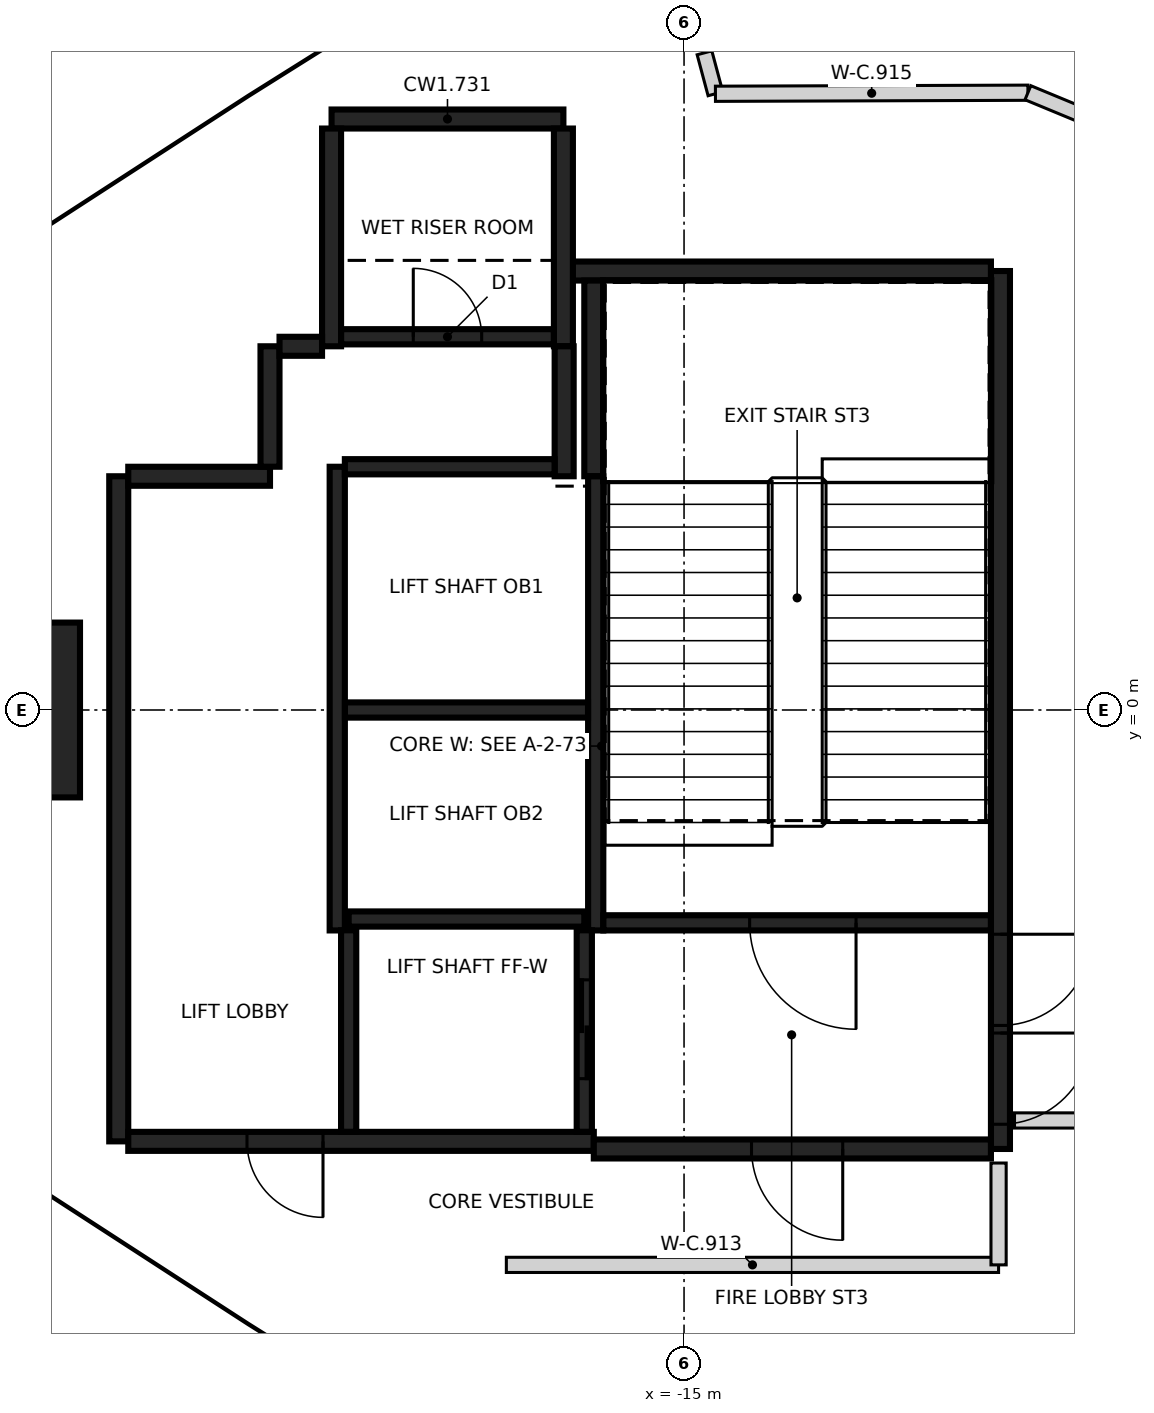
"""IFC4 building model, lengths in metres.
Left out: names, types, materials, properties, quantities, classifications, styles, units other than length and angle.
Written with IfcOpenShell. Run it as: python <this file> out.ifc"""

import sys

from ifc_helpers import new_model, si_unit, direction, frame, frame_2d, origin, origin_2d, place, context, subcontext, project, spatial, rectangle, extrude, element, fill, save


model = new_model("IFC4")
c1 = context("Model", 3, precision=1e-05, world=origin(), true_north=direction((0.0, 1.0)))
c2 = subcontext(c1, "Body", "Model", "MODEL_VIEW")
j1 = project(units=[si_unit("LENGTHUNIT", "METRE"), si_unit("PLANEANGLEUNIT", "RADIAN")], contexts=[c1])
p1 = place(None, origin())
s1 = spatial("IfcSite", under=j1, at=p1, CompositionType="ELEMENT")
p2 = place(p1, origin())
s2 = spatial("IfcBuilding", under=s1, at=p2, CompositionType="ELEMENT")
p3 = place(p2, frame((0.0, 0.0, 257.4)))
s3 = spatial("IfcBuildingStorey", under=s2, at=p3, CompositionType="ELEMENT", Elevation=257.4)
p4 = place(p3, frame((-24.347, 0.0, -0.4), z_axis=(0.0, 0.0, 1.0), x_axis=(1.0, 0.0, 0.0)))
e1 = element("IfcColumn", 1, at=p4, inside=s3, PredefinedType="COLUMN", context=c2, shape_type="SweptSolid", body=[
    extrude(rectangle(XDim=2.8, YDim=2.3, at=origin_2d()), origin(), (0.0, 0.0, 1.0), 4.85),
])
p5 = place(p3, frame((-10.837, 5.775, 0.0), z_axis=(0.0, 0.0, 1.0), x_axis=(0.0, -1.0, 0.0)))
e2 = element("IfcWall", 2, at=p5, inside=s3, PredefinedType="SHEAR", context=c2, shape_type="SweptSolid", body=[
    extrude(rectangle(XDim=11.55, YDim=0.25, at=frame_2d((5.775, 0.0))), origin(), (0.0, 0.0, 1.0), 4.45),
])
p6 = place(p5, frame((10.025, 0.0, 0.0)))
e3 = element("IfcOpeningElement", 3, at=p6, cuts=e2, PredefinedType="OPENING", context=c2, shape_type="SweptSolid", body=[
    extrude(rectangle(XDim=1.2, YDim=2.1, at=frame_2d((0.6, 1.05))), frame((0.0, 0.135, 0.0), z_axis=(0.0, -1.0, 0.0), x_axis=(1.0, 0.0, 0.0)), (0.0, 0.0, 1.0), 0.27),
])
p7 = place(p5, frame((8.725, 0.0, 0.0)))
e4 = element("IfcOpeningElement", 4, at=p7, cuts=e2, PredefinedType="OPENING", context=c2, shape_type="SweptSolid", body=[
    extrude(rectangle(XDim=1.2, YDim=2.1, at=frame_2d((0.6, 1.05))), frame((0.0, 0.135, 0.0), z_axis=(0.0, -1.0, 0.0), x_axis=(1.0, 0.0, 0.0)), (0.0, 0.0, 1.0), 0.27),
])
p8 = place(p3, frame((-22.437, -5.675, 0.0), z_axis=(0.0, 0.0, 1.0), x_axis=(0.0, 1.0, 0.0)))
e5 = element("IfcWall", 5, at=p8, inside=s3, PredefinedType="SHEAR", context=c2, shape_type="SweptSolid", body=[
    extrude(rectangle(XDim=8.75, YDim=0.25, at=frame_2d((4.375, 0.0))), origin(), (0.0, 0.0, 1.0), 4.45),
])
p9 = place(p3, frame((-16.187, -5.675, 0.0), z_axis=(0.0, 0.0, 1.0), x_axis=(-1.0, 0.0, 0.0)))
e6 = element("IfcWall", 6, at=p9, inside=s3, PredefinedType="SHEAR", context=c2, shape_type="SweptSolid", body=[
    extrude(rectangle(XDim=6.125, YDim=0.25, at=frame_2d((3.062, 0.0))), origin(), (0.0, 0.0, 1.0), 4.45),
])
p10 = place(p9, frame((3.563, 0.0, 0.0)))
e7 = element("IfcOpeningElement", 7, at=p10, cuts=e6, PredefinedType="OPENING", context=c2, shape_type="SweptSolid", body=[
    extrude(rectangle(XDim=1.0, YDim=2.1, at=frame_2d((0.5, 1.05))), frame((0.0, 0.135, 0.0), z_axis=(0.0, -1.0, 0.0), x_axis=(1.0, 0.0, 0.0)), (0.0, 0.0, 1.0), 0.27),
])
p11 = place(p3, frame((-10.963, -5.775, 0.0), z_axis=(0.0, 0.0, 1.0), x_axis=(-1.0, 0.0, 0.0)))
e8 = element("IfcWall", 8, at=p11, inside=s3, PredefinedType="SHEAR", context=c2, shape_type="SweptSolid", body=[
    extrude(rectangle(XDim=5.225, YDim=0.25, at=frame_2d((2.612, 0.0))), origin(), (0.0, 0.0, 1.0), 4.45),
])
p12 = place(p11, frame((1.95, 0.0, 0.0)))
e9 = element("IfcOpeningElement", 9, at=p12, cuts=e8, PredefinedType="OPENING", context=c2, shape_type="SweptSolid", body=[
    extrude(rectangle(XDim=1.2, YDim=2.1, at=frame_2d((0.6, 1.05))), frame((0.0, 0.135, 0.0), z_axis=(0.0, -1.0, 0.0), x_axis=(1.0, 0.0, 0.0)), (0.0, 0.0, 1.0), 0.27),
])
p13 = place(p3, frame((-16.472, 5.775, 0.0), z_axis=(0.0, 0.0, 1.0), x_axis=(1.0, 0.0, 0.0)))
e10 = element("IfcWall", 10, at=p13, inside=s3, PredefinedType="SHEAR", context=c2, shape_type="SweptSolid", body=[
    extrude(rectangle(XDim=5.51, YDim=0.25, at=frame_2d((2.755, 0.0))), origin(), (0.0, 0.0, 1.0), 4.45),
])
p14 = place(p3, frame((-19.637, 7.775, 0.0), z_axis=(0.0, 0.0, 1.0), x_axis=(1.0, 0.0, 0.0)))
e11 = element("IfcWall", 11, at=p14, inside=s3, PredefinedType="SHEAR", context=c2, shape_type="SweptSolid", body=[
    extrude(rectangle(XDim=3.05, YDim=0.25, at=frame_2d((1.525, 0.0))), origin(), (0.0, 0.0, 1.0), 4.45),
])
for number, where, z_axis, x_axis in (
    (12, (-16.587, 7.65, 0.0), (0.0, 0.0, 1.0), (0.0, -1.0, 0.0)),
    (13, (-19.637, 4.785, 0.0), (0.0, 0.0, 1.0), (0.0, 1.0, 0.0)),
):
    element("IfcWall", number, at=place(p3, frame(where, z_axis=z_axis, x_axis=x_axis)), inside=s3, PredefinedType="SHEAR", context=c2, shape_type="SweptSolid", body=[
        extrude(rectangle(XDim=2.865, YDim=0.25, at=frame_2d((1.432, 0.0))), origin(), (0.0, 0.0, 1.0), 4.45),
    ])
p15 = place(p3, frame((-16.187, 3.075, 0.0), z_axis=(0.0, 0.0, 1.0), x_axis=(0.0, 1.0, 0.0)))
e14 = element("IfcWall", 14, at=p15, inside=s3, PredefinedType="SHEAR", context=c2, shape_type="SweptSolid", body=[
    extrude(rectangle(XDim=2.575, YDim=0.25, at=frame_2d((1.287, 0.0))), origin(), (0.0, 0.0, 1.0), 4.45),
])
p16 = place(p3, frame((-22.312, 3.075, 0.0), z_axis=(0.0, 0.0, 1.0), x_axis=(1.0, 0.0, 0.0)))
e15 = element("IfcWall", 15, at=p16, inside=s3, PredefinedType="SHEAR", context=c2, shape_type="SweptSolid", body=[
    extrude(rectangle(XDim=1.865, YDim=0.25, at=frame_2d((0.932, 0.0))), origin(), (0.0, 0.0, 1.0), 4.45),
])
p17 = place(p3, frame((-16.577, 4.785, 0.0), z_axis=(0.0, 0.0, 1.0), x_axis=(0.0, -1.0, 0.0)))
e16 = element("IfcWall", 16, at=p17, inside=s3, PredefinedType="SHEAR", context=c2, shape_type="SweptSolid", body=[
    extrude(rectangle(XDim=1.71, YDim=0.25, at=frame_2d((0.855, 0.0))), origin(), (0.0, 0.0, 1.0), 4.45),
])
p18 = place(p3, frame((-20.447, 3.2, 0.0), z_axis=(0.0, 0.0, 1.0), x_axis=(0.0, 1.0, 0.0)))
e17 = element("IfcWall", 17, at=p18, inside=s3, PredefinedType="SHEAR", context=c2, shape_type="SweptSolid", body=[
    extrude(rectangle(XDim=1.584, YDim=0.25, at=frame_2d((0.792, 0.0))), origin(), (0.0, 0.0, 1.0), 4.45),
])
p19 = place(p3, frame((-20.322, 4.785, 0.0), z_axis=(0.0, 0.0, 1.0), x_axis=(1.0, 0.0, 0.0)))
e18 = element("IfcWall", 18, at=p19, inside=s3, PredefinedType="SHEAR", context=c2, shape_type="SweptSolid", body=[
    extrude(rectangle(XDim=0.559, YDim=0.25, at=frame_2d((0.28, 0.0))), origin(), (0.0, 0.0, 1.0), 4.45),
])
p20 = place(p3, frame((-16.162, 3.074, 0.0), z_axis=(0.0, 0.0, 1.0), x_axis=(0.0, -1.0, 0.0)))
e19 = element("IfcWall", 19, at=p20, inside=s3, PredefinedType="SHEAR", context=c2, shape_type="SweptSolid", body=[
    extrude(rectangle(XDim=5.974, YDim=0.2, at=frame_2d((2.987, 0.0))), origin(), (0.0, 0.0, 1.0), 4.45),
])
p21 = place(p3, frame((-19.562, -2.9, 0.0), z_axis=(0.0, 0.0, 1.0), x_axis=(0.0, 1.0, 0.0)))
e20 = element("IfcWall", 20, at=p21, inside=s3, PredefinedType="SHEAR", context=c2, shape_type="SweptSolid", body=[
    extrude(rectangle(XDim=6.1, YDim=0.2, at=frame_2d((3.05, 0.0))), origin(), (0.0, 0.0, 1.0), 4.45),
])
p22 = place(p3, frame((-10.963, -2.8, 0.0), z_axis=(0.0, 0.0, 1.0), x_axis=(-1.0, 0.0, 0.0)))
e21 = element("IfcWall", 21, at=p22, inside=s3, PredefinedType="SHEAR", context=c2, shape_type="SweptSolid", body=[
    extrude(rectangle(XDim=5.098, YDim=0.2, at=frame_2d((2.549, 0.0))), origin(), (0.0, 0.0, 1.0), 4.45),
])
p23 = place(p22, frame((1.774, 0.0, 0.0)))
e22 = element("IfcOpeningElement", 22, at=p23, cuts=e21, PredefinedType="OPENING", context=c2, shape_type="SweptSolid", body=[
    extrude(rectangle(XDim=1.4, YDim=2.1, at=frame_2d((0.7, 1.05))), frame((0.0, 0.11, 0.0), z_axis=(0.0, -1.0, 0.0), x_axis=(1.0, 0.0, 0.0)), (0.0, 0.0, 1.0), 0.22),
])
p24 = place(p3, frame((-16.263, 0.0, 0.0), z_axis=(0.0, 0.0, 1.0), x_axis=(-1.0, 0.0, 0.0)))
e23 = element("IfcWall", 23, at=p24, inside=s3, PredefinedType="SHEAR", context=c2, shape_type="SweptSolid", body=[
    extrude(rectangle(XDim=3.198, YDim=0.2, at=frame_2d((1.599, 0.0))), origin(), (0.0, 0.0, 1.0), 4.45),
])
p25 = place(p3, frame((-19.511, 4.91, 0.0), z_axis=(0.0, 0.0, 1.0), x_axis=(1.0, 0.0, 0.0)))
e24 = element("IfcWall", 24, at=p25, inside=s3, PredefinedType="SHEAR", context=c2, shape_type="SweptSolid", body=[
    extrude(rectangle(XDim=2.798, YDim=0.2, at=frame_2d((1.399, 0.0))), origin(), (0.0, 0.0, 1.0), 4.45),
])
p26 = place(p25, frame((0.949, 0.0, 0.0)))
e25 = element("IfcOpeningElement", 25, at=p26, cuts=e24, PredefinedType="OPENING", context=c2, shape_type="SweptSolid", body=[
    extrude(rectangle(XDim=0.9, YDim=2.1, at=frame_2d((0.45, 1.05))), frame((0.0, 0.11, 0.0), z_axis=(0.0, -1.0, 0.0), x_axis=(1.0, 0.0, 0.0)), (0.0, 0.0, 1.0), 0.22),
])
p27 = place(p3, frame((-19.462, 3.2, 0.0), z_axis=(0.0, 0.0, 1.0), x_axis=(1.0, 0.0, 0.0)))
e26 = element("IfcWall", 26, at=p27, inside=s3, PredefinedType="SHEAR", context=c2, shape_type="SweptSolid", body=[
    extrude(rectangle(XDim=2.759, YDim=0.2, at=frame_2d((1.379, 0.0))), origin(), (0.0, 0.0, 1.0), 4.45),
])
p28 = place(p3, frame((-19.412, -2.75, 0.0), z_axis=(0.0, 0.0, 1.0), x_axis=(1.0, 0.0, 0.0)))
e27 = element("IfcWall", 27, at=p28, inside=s3, PredefinedType="SHEAR", context=c2, shape_type="SweptSolid", body=[
    extrude(rectangle(XDim=3.1, YDim=0.2, at=frame_2d((1.55, 0.0))), origin(), (0.0, 0.0, 1.0), 4.45),
])
p29 = place(p3, frame((-16.312, -2.898, 0.0), z_axis=(0.0, 0.0, 1.0), x_axis=(0.0, -1.0, 0.0)))
e28 = element("IfcWall", 28, at=p29, inside=s3, PredefinedType="SHEAR", context=c2, shape_type="SweptSolid", body=[
    extrude(rectangle(XDim=2.651, YDim=0.2, at=frame_2d((1.325, 0.0))), origin(), (0.0, 0.0, 1.0), 4.45),
])
p30 = place(p29, frame((0.652, 0.0, 0.0)))
e29 = element("IfcOpeningElement", 29, at=p30, cuts=e28, PredefinedType="OPENING", context=c2, shape_type="SweptSolid", body=[
    extrude(rectangle(XDim=1.3, YDim=2.1, at=frame_2d((0.65, 1.05))), frame((0.0, 0.11, 0.0), z_axis=(0.0, -1.0, 0.0), x_axis=(1.0, 0.0, 0.0)), (0.0, 0.0, 1.0), 0.22),
])
p31 = place(p3, frame((-19.412, -5.549, 0.0), z_axis=(0.0, 0.0, 1.0), x_axis=(0.0, 1.0, 0.0)))
e30 = element("IfcWall", 30, at=p31, inside=s3, PredefinedType="SHEAR", context=c2, shape_type="SweptSolid", body=[
    extrude(rectangle(XDim=2.651, YDim=0.2, at=frame_2d((1.325, 0.0))), origin(), (0.0, 0.0, 1.0), 4.45),
])
p32 = place(p3, frame((-17.338, -7.3, 0.0), z_axis=(0.0, 0.0, 1.0), x_axis=(1.0, 0.0, 0.0)))
e31 = element("IfcWall", 31, at=p32, inside=s3, PredefinedType="PARTITIONING", context=c2, shape_type="SweptSolid", body=[
    extrude(rectangle(XDim=6.476, YDim=0.2, at=frame_2d((3.238, 0.0))), origin(), (0.0, 0.0, 1.0), 4.45),
])
p33 = place(p3, frame((-14.731, 8.646, 0.0), z_axis=(0.0, 0.0, 1.0), x_axis=(0.258152815448, -0.966104095777, 0.0)))
e32 = element("IfcWall", 32, at=p33, inside=s3, PredefinedType="PARTITIONING", context=c2, shape_type="SweptSolid", body=[
    extrude(rectangle(XDim=0.558, YDim=0.2, at=frame_2d((0.279, 0.0))), origin(), (0.0, 0.0, 1.0), 4.45),
])
p34 = place(p3, frame((-14.587, 8.107, 0.0), z_axis=(0.0, 0.0, 1.0), x_axis=(0.999994067454, 0.003444569184, 0.0)))
e33 = element("IfcWall", 33, at=p34, inside=s3, PredefinedType="PARTITIONING", context=c2, shape_type="SweptSolid", body=[
    extrude(rectangle(XDim=4.111, YDim=0.2, at=frame_2d((2.055, 0.0))), origin(), (0.0, 0.0, 1.0), 4.45),
])
p35 = place(p3, frame((-10.862, -7.3, 0.0), z_axis=(0.0, 0.0, 1.0), x_axis=(0.0, 1.0, 0.0)))
e34 = element("IfcWall", 34, at=p35, inside=s3, PredefinedType="PARTITIONING", context=c2, shape_type="SweptSolid", body=[
    extrude(rectangle(XDim=1.34, YDim=0.2, at=frame_2d((0.67, 0.0))), origin(), (0.0, 0.0, 1.0), 4.45),
])
p36 = place(p3, frame((-10.652, -5.4, 0.0), z_axis=(0.0, 0.0, 1.0), x_axis=(1.0, 0.0, 0.0)))
e35 = element("IfcWall", 35, at=p36, inside=s3, PredefinedType="PARTITIONING", context=c2, shape_type="SweptSolid", body=[
    extrude(rectangle(XDim=2.083, YDim=0.2, at=frame_2d((1.042, 0.0))), origin(), (0.0, 0.0, 1.0), 4.45),
])
p37 = place(p3, frame((-10.476, 8.121, 0.0), z_axis=(0.0, 0.0, 1.0), x_axis=(0.923898220274, -0.382638312998, 0.0)))
e36 = element("IfcWall", 36, at=p37, inside=s3, PredefinedType="PARTITIONING", context=c2, shape_type="SweptSolid", body=[
    extrude(rectangle(XDim=1.43, YDim=0.2, at=frame_2d((0.715, 0.0))), origin(), (0.0, 0.0, 1.0), 4.45),
])
p38 = place(p30, origin())
e37 = element("IfcDoor", 37, at=p38, inside=s3, OperationType="SLIDING_TO_RIGHT", PredefinedType="DOOR", context=c2, shape_type="SweptSolid", body=[
    extrude(rectangle(XDim=1.3, YDim=2.1, at=frame_2d((0.65, 1.05))), frame((0.0, 0.025, 0.0), z_axis=(0.0, -1.0, 0.0), x_axis=(1.0, 0.0, 0.0)), (0.0, 0.0, 1.0), 0.05),
])
fill(e29, e37)
p39 = place(p10, origin())
e38 = element("IfcDoor", 38, at=p39, inside=s3, OperationType="SINGLE_SWING_LEFT", PredefinedType="DOOR", context=c2, shape_type="SweptSolid", body=[
    extrude(rectangle(XDim=1.0, YDim=2.1, at=frame_2d((0.5, 1.05))), frame((0.0, 0.025, 0.0), z_axis=(0.0, -1.0, 0.0), x_axis=(1.0, 0.0, 0.0)), (0.0, 0.0, 1.0), 0.05),
])
fill(e7, e38)
p40 = place(p6, origin())
e39 = element("IfcDoor", 39, at=p40, inside=s3, OperationType="SINGLE_SWING_LEFT", PredefinedType="DOOR", context=c2, shape_type="SweptSolid", body=[
    extrude(rectangle(XDim=1.2, YDim=2.1, at=frame_2d((0.6, 1.05))), frame((0.0, 0.025, 0.0), z_axis=(0.0, -1.0, 0.0), x_axis=(1.0, 0.0, 0.0)), (0.0, 0.0, 1.0), 0.05),
])
fill(e3, e39)
p41 = place(p7, origin())
e40 = element("IfcDoor", 40, at=p41, inside=s3, OperationType="SINGLE_SWING_RIGHT", PredefinedType="DOOR", context=c2, shape_type="SweptSolid", body=[
    extrude(rectangle(XDim=1.2, YDim=2.1, at=frame_2d((0.6, 1.05))), frame((0.0, 0.025, 0.0), z_axis=(0.0, -1.0, 0.0), x_axis=(1.0, 0.0, 0.0)), (0.0, 0.0, 1.0), 0.05),
])
fill(e4, e40)
p42 = place(p23, origin())
e41 = element("IfcDoor", 41, at=p42, inside=s3, OperationType="SINGLE_SWING_RIGHT", PredefinedType="DOOR", context=c2, shape_type="SweptSolid", body=[
    extrude(rectangle(XDim=1.4, YDim=2.1, at=frame_2d((0.7, 1.05))), frame((0.0, 0.025, 0.0), z_axis=(0.0, -1.0, 0.0), x_axis=(1.0, 0.0, 0.0)), (0.0, 0.0, 1.0), 0.05),
])
fill(e22, e41)
p43 = place(p26, origin())
e42 = element("IfcDoor", 42, at=p43, inside=s3, OperationType="SINGLE_SWING_LEFT", PredefinedType="DOOR", context=c2, shape_type="SweptSolid", body=[
    extrude(rectangle(XDim=0.9, YDim=2.1, at=frame_2d((0.45, 1.05))), frame((0.0, 0.025, 0.0), z_axis=(0.0, -1.0, 0.0), x_axis=(1.0, 0.0, 0.0)), (0.0, 0.0, 1.0), 0.05),
])
fill(e25, e42)
p44 = place(p12, origin())
e43 = element("IfcDoor", 43, at=p44, inside=s3, OperationType="SINGLE_SWING_LEFT", PredefinedType="DOOR", context=c2, shape_type="SweptSolid", body=[
    extrude(rectangle(XDim=1.2, YDim=2.1, at=frame_2d((0.6, 1.05))), frame((0.0, 0.025, 0.0), z_axis=(0.0, -1.0, 0.0), x_axis=(1.0, 0.0, 0.0)), (0.0, 0.0, 1.0), 0.05),
])
fill(e9, e43)
save(model, sys.argv[1])
